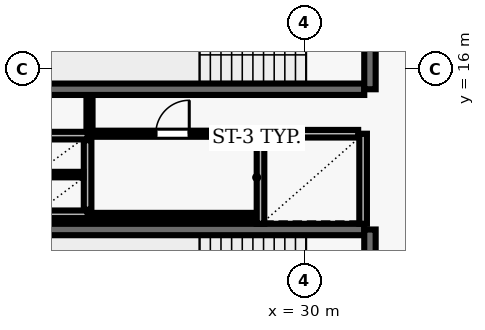
"""IFC4 building model, lengths in metres.
Left out: names, types, materials, properties, quantities, classifications, styles, units other than length and angle.
Written with IfcOpenShell. Run it as: python <this file> out.ifc"""

import sys

from ifc_helpers import new_model, si_unit, direction, frame, frame_2d, origin, place, context, subcontext, project, spatial, rectangle, extrude, element, fill, save


model = new_model("IFC4")
c1 = context("Model", 3, precision=1e-05, world=origin(), true_north=direction((0.0, 1.0)))
c2 = subcontext(c1, "Body", "Model", "MODEL_VIEW")
j1 = project(units=[si_unit("LENGTHUNIT", "METRE"), si_unit("PLANEANGLEUNIT", "RADIAN")], contexts=[c1])
p1 = place(None, origin())
s1 = spatial("IfcSite", under=j1, at=p1, CompositionType="ELEMENT")
p2 = place(p1, origin())
s2 = spatial("IfcBuilding", under=s1, at=p2, CompositionType="ELEMENT")
p3 = place(p2, frame((0.0, 0.0, 107.3)))
s3 = spatial("IfcBuildingStorey", under=s2, at=p3, CompositionType="ELEMENT", Elevation=107.3)
p4 = place(p3, frame((23.22, 15.47, 0.0), z_axis=(0.0, 0.0, 1.0), x_axis=(1.0, 0.0, 0.0)))
e1 = element("IfcWall", 1, at=p4, inside=s3, PredefinedType="SHEAR", context=c2, shape_type="SweptSolid", body=[
    extrude(rectangle(XDim=8.36, YDim=0.3, at=frame_2d((4.18, 0.0))), origin(), (0.0, 0.0, 1.0), 3.69),
])
p5 = place(p3, frame((31.73, 15.47, 0.0), z_axis=(0.0, 0.0, 1.0), x_axis=(0.0, 1.0, 0.0)))
e2 = element("IfcWall", 2, at=p5, inside=s3, PredefinedType="SHEAR", context=c2, shape_type="SweptSolid", body=[
    extrude(rectangle(XDim=3.51, YDim=0.3, at=frame_2d((1.755, 0.0))), origin(), (0.0, 0.0, 1.0), 3.69),
])
p6 = place(p5, frame((1.18, 0.0, 0.0)))
e3 = element("IfcOpeningElement", 3, at=p6, cuts=e2, PredefinedType="OPENING", context=c2, shape_type="SweptSolid", body=[
    extrude(rectangle(XDim=1.15, YDim=2.15, at=frame_2d((0.575, 1.075))), frame((0.0, 0.16, 0.0), z_axis=(0.0, -1.0, 0.0), x_axis=(1.0, 0.0, 0.0)), (0.0, 0.0, 1.0), 0.32),
])
p7 = place(p3, frame((31.58, 11.78, 0.0), z_axis=(0.0, 0.0, 1.0), x_axis=(-1.0, 0.0, 0.0)))
e4 = element("IfcWall", 4, at=p7, inside=s3, PredefinedType="SHEAR", context=c2, shape_type="SweptSolid", body=[
    extrude(rectangle(XDim=8.36, YDim=0.3, at=frame_2d((4.18, 0.0))), origin(), (0.0, 0.0, 1.0), 3.69),
])
p8 = place(p3, frame((31.73, 8.27, 0.0), z_axis=(0.0, 0.0, 1.0), x_axis=(0.0, 1.0, 0.0)))
e5 = element("IfcWall", 5, at=p8, inside=s3, PredefinedType="SHEAR", context=c2, shape_type="SweptSolid", body=[
    extrude(rectangle(XDim=3.51, YDim=0.3, at=frame_2d((1.755, 0.0))), origin(), (0.0, 0.0, 1.0), 3.69),
])
p9 = place(p8, frame((1.18, 0.0, 0.0)))
e6 = element("IfcOpeningElement", 6, at=p9, cuts=e5, PredefinedType="OPENING", context=c2, shape_type="SweptSolid", body=[
    extrude(rectangle(XDim=1.15, YDim=2.15, at=frame_2d((0.575, 1.075))), frame((0.0, 0.16, 0.0), z_axis=(0.0, -1.0, 0.0), x_axis=(1.0, 0.0, 0.0)), (0.0, 0.0, 1.0), 0.32),
])
for number, where, z_axis, x_axis in (
    (7, (28.85, 14.3, 0.0), (0.0, 0.0, 1.0), (0.0, -1.0, 0.0)),
    (8, (31.55, 11.93, 0.0), (0.0, 0.0, 1.0), (0.0, 1.0, 0.0)),
):
    element("IfcWall", number, at=place(p3, frame(where, z_axis=z_axis, x_axis=x_axis)), inside=s3, PredefinedType="SOLIDWALL", context=c2, shape_type="SweptSolid", body=[
        extrude(rectangle(XDim=2.37, YDim=0.2, at=frame_2d((1.185, 0.0))), origin(), (0.0, 0.0, 1.0), 3.69),
    ])
p10 = place(p3, frame((31.42, 14.3, 0.0), z_axis=(0.0, 0.0, 1.0), x_axis=(-1.0, 0.0, 0.0)))
e9 = element("IfcWall", 9, at=p10, inside=s3, PredefinedType="SOLIDWALL", context=c2, shape_type="SweptSolid", body=[
    extrude(rectangle(XDim=2.44, YDim=0.2, at=frame_2d((1.22, 0.0))), origin(), (0.0, 0.0, 1.0), 3.69),
])
for number, where, z_axis, x_axis in (
    (10, (22.9, 14.25, 0.0), (0.0, 0.0, 1.0), (1.0, 0.0, 0.0)),
    (11, (22.9, 12.18, 0.0), (0.0, 0.0, 1.0), (1.0, 0.0, 0.0)),
):
    element("IfcWall", number, at=place(p3, frame(where, z_axis=z_axis, x_axis=x_axis)), inside=s3, PredefinedType="SOLIDWALL", context=c2, shape_type="SweptSolid", body=[
        extrude(rectangle(XDim=1.4, YDim=0.2, at=frame_2d((0.7, 0.0))), origin(), (0.0, 0.0, 1.0), 3.69),
    ])
p11 = place(p3, frame((24.3, 12.3, 0.0), z_axis=(0.0, 0.0, 1.0), x_axis=(0.0, 1.0, 0.0)))
e12 = element("IfcWall", 12, at=p11, inside=s3, PredefinedType="SOLIDWALL", context=c2, shape_type="SweptSolid", body=[
    extrude(rectangle(XDim=1.83, YDim=0.2, at=frame_2d((0.915, 0.0))), origin(), (0.0, 0.0, 1.0), 3.69),
])
p12 = place(p3, frame((23.01, 13.225, 0.0), z_axis=(0.0, 0.0, 1.0), x_axis=(1.0, 0.0, 0.0)))
e13 = element("IfcWall", 13, at=p12, inside=s3, PredefinedType="PARTITIONING", context=c2, shape_type="SweptSolid", body=[
    extrude(rectangle(XDim=1.18, YDim=0.145, at=frame_2d((0.59, 0.0))), origin(), (0.0, 0.0, 1.0), 3.69),
])
p13 = place(p3, frame((24.35, 12.15, 0.0), z_axis=(0.0, 0.0, 1.0), x_axis=(1.0, 0.0, 0.0)))
e14 = element("IfcWall", 14, at=p13, inside=s3, PredefinedType="PARTITIONING", context=c2, shape_type="SweptSolid", body=[
    extrude(rectangle(XDim=4.37, YDim=0.135, at=frame_2d((2.185, 0.0))), origin(), (0.0, 0.0, 1.0), 3.69),
])
p14 = place(p3, frame((24.35, 14.3, 0.0), z_axis=(0.0, 0.0, 1.0), x_axis=(1.0, 0.0, 0.0)))
e15 = element("IfcWall", 15, at=p14, inside=s3, PredefinedType="PARTITIONING", context=c2, shape_type="SweptSolid", body=[
    extrude(rectangle(XDim=4.37, YDim=0.16, at=frame_2d((2.185, 0.0))), origin(), (0.0, 0.0, 1.0), 3.69),
])
p15 = place(p14, frame((1.745, 0.0, 0.0)))
e16 = element("IfcOpeningElement", 16, at=p15, cuts=e15, PredefinedType="OPENING", context=c2, shape_type="SweptSolid", body=[
    extrude(rectangle(XDim=0.88, YDim=2.1, at=frame_2d((0.44, 1.05))), frame((0.0, 0.09, 0.0), z_axis=(0.0, -1.0, 0.0), x_axis=(1.0, 0.0, 0.0)), (0.0, 0.0, 1.0), 0.18),
])
p16 = place(p3, frame((24.35, 15.29, 0.0), z_axis=(0.0, 0.0, 1.0), x_axis=(0.0, -1.0, 0.0)))
e17 = element("IfcWall", 17, at=p16, inside=s3, PredefinedType="PARTITIONING", context=c2, shape_type="SweptSolid", body=[
    extrude(rectangle(XDim=0.915, YDim=0.16, at=frame_2d((0.458, 0.0))), origin(), (0.0, 0.0, 1.0), 3.69),
])
p17 = place(p15, origin())
e18 = element("IfcDoor", 18, at=p17, inside=s3, OperationType="SINGLE_SWING_RIGHT", PredefinedType="DOOR", context=c2, shape_type="SweptSolid", body=[
    extrude(rectangle(XDim=0.88, YDim=2.1, at=frame_2d((0.44, 1.05))), frame((0.0, 0.025, 0.0), z_axis=(0.0, -1.0, 0.0), x_axis=(1.0, 0.0, 0.0)), (0.0, 0.0, 1.0), 0.05),
])
fill(e16, e18)
save(model, sys.argv[1])
